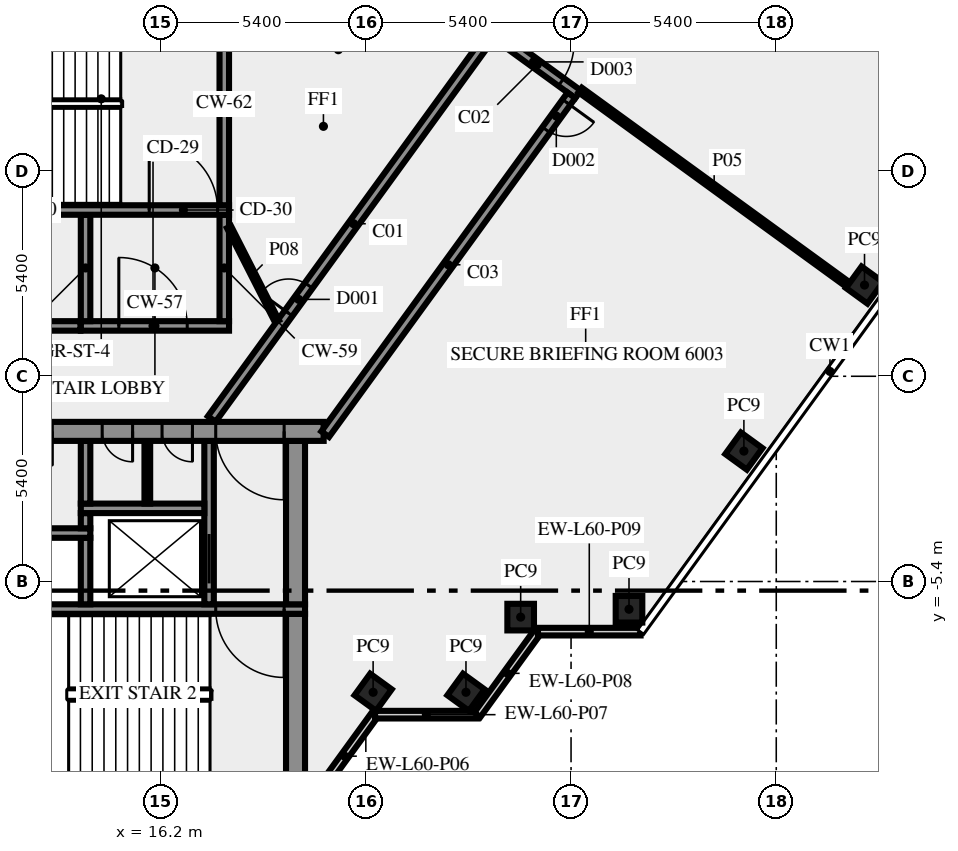
"""IFC4 building model, lengths in metres.
Left out: names, types, materials, properties, quantities, classifications, styles, units other than length and angle.
Written with IfcOpenShell. Run it as: python <this file> out.ifc"""

import sys

from ifc_helpers import new_model, si_unit, direction, frame, frame_2d, origin, origin_2d, place, context, subcontext, project, spatial, rectangle, extrude, element, fill, save


model = new_model("IFC4")
c1 = context("Model", 3, precision=1e-05, world=origin(), true_north=direction((0.0, 1.0)))
c2 = subcontext(c1, "Body", "Model", "MODEL_VIEW")
j1 = project(units=[si_unit("LENGTHUNIT", "METRE"), si_unit("PLANEANGLEUNIT", "RADIAN")], contexts=[c1])
p1 = place(None, origin())
s1 = spatial("IfcSite", under=j1, at=p1, CompositionType="ELEMENT")
p2 = place(p1, origin())
s2 = spatial("IfcBuilding", under=s1, at=p2, CompositionType="ELEMENT")
p3 = place(p2, frame((0.0, 0.0, 257.0)))
s3 = spatial("IfcBuildingStorey", under=s2, at=p3, CompositionType="ELEMENT", Elevation=257.0)
for number, where, z_axis, x_axis in (
    (1, (21.792, -8.315, 0.0), (0.0, 0.0, 1.0), (0.588, 0.809, 0.0)),
    (2, (24.235, -8.315, 0.0), (0.0, 0.0, 1.0), (0.588, 0.809, 0.0)),
    (3, (25.674, -6.337, 0.0), (0.0, 0.0, 1.0), (1.0, 0.0, 0.0)),
    (4, (28.525, -6.13, 0.0), (0.0, 0.0, 1.0), (1.0, 0.0, 0.0)),
    (5, (31.548, -1.969, 0.0), (0.0, 0.0, 1.0), (0.588, 0.809, 0.0)),
    (6, (34.722, 2.4, 0.0), (0.0, 0.0, 1.0), (0.588, 0.809, 0.0)),
):
    element("IfcColumn", number, at=place(p3, frame(where, z_axis=z_axis, x_axis=x_axis)), inside=s3, PredefinedType="COLUMN", context=c2, shape_type="SweptSolid", body=[
        extrude(rectangle(XDim=0.7, YDim=0.7, at=origin_2d()), origin(), (0.0, 0.0, 1.0), 3.65),
    ])
p4 = place(p3, frame((20.253, -11.083, 0.0), z_axis=(0.0, 0.0, 1.0), x_axis=(0.587766567315, 0.809030569476, 0.0)))
e7 = element("IfcWall", 7, at=p4, inside=s3, PredefinedType="SOLIDWALL", context=c2, shape_type="SweptSolid", body=[
    extrude(rectangle(XDim=2.688, YDim=0.2, at=frame_2d((1.344, 0.0))), origin(), (0.0, 0.0, 1.0), 3.65),
])
p5 = place(p3, frame((21.843, -8.904, 0.0), z_axis=(0.0, 0.0, 1.0), x_axis=(1.0, 0.0, 0.0)))
e8 = element("IfcWall", 8, at=p5, inside=s3, PredefinedType="SOLIDWALL", context=c2, shape_type="SweptSolid", body=[
    extrude(rectangle(XDim=2.7, YDim=0.2, at=frame_2d((1.35, 0.0))), origin(), (0.0, 0.0, 1.0), 3.65),
])
p6 = place(p3, frame((24.533, -8.909, 0.0), z_axis=(0.0, 0.0, 1.0), x_axis=(0.587720002413, 0.809064397168, 0.0)))
e9 = element("IfcWall", 9, at=p6, inside=s3, PredefinedType="SOLIDWALL", context=c2, shape_type="SweptSolid", body=[
    extrude(rectangle(XDim=2.7, YDim=0.2, at=frame_2d((1.35, 0.0))), origin(), (0.0, 0.0, 1.0), 3.65),
])
p7 = place(p3, frame((26.13, -6.719, 0.0), z_axis=(0.0, 0.0, 1.0), x_axis=(1.0, 0.0, 0.0)))
e10 = element("IfcWall", 10, at=p7, inside=s3, PredefinedType="SOLIDWALL", context=c2, shape_type="SweptSolid", body=[
    extrude(rectangle(XDim=2.7, YDim=0.2, at=frame_2d((1.35, 0.0))), origin(), (0.0, 0.0, 1.0), 3.65),
])
p8 = place(p3, frame((19.75, -10.5, 0.0), z_axis=(0.0, 0.0, 1.0), x_axis=(0.0, 1.0, 0.0)))
e11 = element("IfcWall", 11, at=p8, inside=s3, PredefinedType="SHEAR", context=c2, shape_type="SweptSolid", body=[
    extrude(rectangle(XDim=4.25, YDim=0.5, at=frame_2d((2.125, 0.0))), origin(), (0.0, 0.0, 1.0), 3.65),
])
p9 = place(p3, frame((20.0, -6.125, 0.0), z_axis=(0.0, 0.0, 1.0), x_axis=(-1.0, 0.0, 0.0)))
e12 = element("IfcWall", 12, at=p9, inside=s3, PredefinedType="SHEAR", context=c2, shape_type="SweptSolid", body=[
    extrude(rectangle(XDim=10.2, YDim=0.25, at=frame_2d((5.1, 0.0))), origin(), (0.0, 0.0, 1.0), 3.65),
])
p10 = place(p9, frame((0.55, 0.0, 0.0)))
e13 = element("IfcOpeningElement", 13, at=p10, cuts=e12, PredefinedType="OPENING", context=c2, shape_type="SweptSolid", body=[
    extrude(rectangle(XDim=1.8, YDim=2.1, at=frame_2d((0.9, 1.05))), frame((0.0, 0.135, 0.0), z_axis=(0.0, -1.0, 0.0), x_axis=(1.0, 0.0, 0.0)), (0.0, 0.0, 1.0), 0.27),
])
p11 = place(p3, frame((14.225, -6.0, 0.0), z_axis=(0.0, 0.0, 1.0), x_axis=(0.0, 1.0, 0.0)))
e14 = element("IfcWall", 14, at=p11, inside=s3, PredefinedType="SHEAR", context=c2, shape_type="SweptSolid", body=[
    extrude(rectangle(XDim=1.75, YDim=0.25, at=frame_2d((0.875, 0.0))), origin(), (0.0, 0.0, 1.0), 3.65),
])
p12 = place(p3, frame((17.475, -6.0, 0.0), z_axis=(0.0, 0.0, 1.0), x_axis=(0.0, 1.0, 0.0)))
e15 = element("IfcWall", 15, at=p12, inside=s3, PredefinedType="SHEAR", context=c2, shape_type="SweptSolid", body=[
    extrude(rectangle(XDim=4.3, YDim=0.25, at=frame_2d((2.15, 0.0))), origin(), (0.0, 0.0, 1.0), 3.65),
])
p13 = place(p12, frame((0.55, 0.0, 0.0)))
e16 = element("IfcOpeningElement", 16, at=p13, cuts=e15, PredefinedType="OPENING", context=c2, shape_type="SweptSolid", body=[
    extrude(rectangle(XDim=1.3, YDim=2.1, at=frame_2d((0.65, 1.05))), frame((0.0, 0.135, 0.0), z_axis=(0.0, -1.0, 0.0), x_axis=(1.0, 0.0, 0.0)), (0.0, 0.0, 1.0), 0.27),
])
p14 = place(p3, frame((19.75, -6.0, 0.0), z_axis=(0.0, 0.0, 1.0), x_axis=(0.0, 1.0, 0.0)))
e17 = element("IfcWall", 17, at=p14, inside=s3, PredefinedType="SHEAR", context=c2, shape_type="SweptSolid", body=[
    extrude(rectangle(XDim=4.3, YDim=0.5, at=frame_2d((2.15, 0.0))), origin(), (0.0, 0.0, 1.0), 3.65),
])
p15 = place(p3, frame((-0.6, -4.125, 0.0), z_axis=(0.0, 0.0, 1.0), x_axis=(1.0, 0.0, 0.0)))
e18 = element("IfcWall", 18, at=p15, inside=s3, PredefinedType="SHEAR", context=c2, shape_type="SweptSolid", body=[
    extrude(rectangle(XDim=14.95, YDim=0.25, at=frame_2d((7.475, 0.0))), origin(), (0.0, 0.0, 1.0), 3.65),
])
p16 = place(p15, frame((2.75, 0.0, 0.0)))
e19 = element("IfcOpeningElement", 19, at=p16, cuts=e18, PredefinedType="OPENING", context=c2, shape_type="SweptSolid", body=[
    extrude(rectangle(XDim=1.3, YDim=2.1, at=frame_2d((0.65, 1.05))), frame((0.0, 0.135, 0.0), z_axis=(0.0, -1.0, 0.0), x_axis=(1.0, 0.0, 0.0)), (0.0, 0.0, 1.0), 0.27),
])
p17 = place(p3, frame((14.225, -4.0, 0.0), z_axis=(0.0, 0.0, 1.0), x_axis=(0.0, 1.0, 0.0)))
e20 = element("IfcWall", 20, at=p17, inside=s3, PredefinedType="SHEAR", context=c2, shape_type="SweptSolid", body=[
    extrude(rectangle(XDim=0.4, YDim=0.25, at=frame_2d((0.2, 0.0))), origin(), (0.0, 0.0, 1.0), 3.65),
])
p18 = place(p3, frame((14.1, -3.475, 0.0), z_axis=(0.0, 0.0, 1.0), x_axis=(1.0, 0.0, 0.0)))
e21 = element("IfcWall", 21, at=p18, inside=s3, PredefinedType="SHEAR", context=c2, shape_type="SweptSolid", body=[
    extrude(rectangle(XDim=3.25, YDim=0.25, at=frame_2d((1.625, 0.0))), origin(), (0.0, 0.0, 1.0), 3.65),
])
p19 = place(p3, frame((14.225, -3.35, 0.0), z_axis=(0.0, 0.0, 1.0), x_axis=(0.0, 1.0, 0.0)))
e22 = element("IfcWall", 22, at=p19, inside=s3, PredefinedType="SHEAR", context=c2, shape_type="SweptSolid", body=[
    extrude(rectangle(XDim=1.65, YDim=0.25, at=frame_2d((0.825, 0.0))), origin(), (0.0, 0.0, 1.0), 3.65),
])
p20 = place(p3, frame((15.85, -3.35, 0.0), z_axis=(0.0, 0.0, 1.0), x_axis=(0.0, 1.0, 0.0)))
e23 = element("IfcWall", 23, at=p20, inside=s3, PredefinedType="PARTITIONING", context=c2, shape_type="SweptSolid", body=[
    extrude(rectangle(XDim=1.65, YDim=0.15, at=frame_2d((0.825, 0.0))), origin(), (0.0, 0.0, 1.0), 3.65),
])
p21 = place(p3, frame((20.49, -1.45, 0.0), z_axis=(0.0, 0.0, 1.0), x_axis=(-1.0, 0.0, 0.0)))
e24 = element("IfcWall", 24, at=p21, inside=s3, PredefinedType="SHEAR", context=c2, shape_type="SweptSolid", body=[
    extrude(rectangle(XDim=40.98, YDim=0.5, at=frame_2d((20.49, 0.0))), origin(), (0.0, 0.0, 1.0), 3.65),
])
p22 = place(p21, frame((38.14, 0.0, 0.0)))
e25 = element("IfcOpeningElement", 25, at=p22, cuts=e24, PredefinedType="OPENING", context=c2, shape_type="SweptSolid", body=[
    extrude(rectangle(XDim=1.8, YDim=2.1, at=frame_2d((0.9, 1.05))), frame((0.0, 0.26, 0.0), z_axis=(0.0, -1.0, 0.0), x_axis=(1.0, 0.0, 0.0)), (0.0, 0.0, 1.0), 0.52),
])
p23 = place(p21, frame((35.89, 0.0, 0.0)))
e26 = element("IfcOpeningElement", 26, at=p23, cuts=e24, PredefinedType="OPENING", context=c2, shape_type="SweptSolid", body=[
    extrude(rectangle(XDim=0.9, YDim=2.1, at=frame_2d((0.45, 1.05))), frame((0.0, 0.26, 0.0), z_axis=(0.0, -1.0, 0.0), x_axis=(1.0, 0.0, 0.0)), (0.0, 0.0, 1.0), 0.52),
])
p24 = place(p21, frame((32.94, 0.0, 0.0)))
e27 = element("IfcOpeningElement", 27, at=p24, cuts=e24, PredefinedType="OPENING", context=c2, shape_type="SweptSolid", body=[
    extrude(rectangle(XDim=0.9, YDim=2.1, at=frame_2d((0.45, 1.05))), frame((0.0, 0.26, 0.0), z_axis=(0.0, -1.0, 0.0), x_axis=(1.0, 0.0, 0.0)), (0.0, 0.0, 1.0), 0.52),
])
p25 = place(p21, frame((31.015, 0.0, 0.0)))
e28 = element("IfcOpeningElement", 28, at=p25, cuts=e24, PredefinedType="OPENING", context=c2, shape_type="SweptSolid", body=[
    extrude(rectangle(XDim=0.8, YDim=2.1, at=frame_2d((0.4, 1.05))), frame((0.0, 0.26, 0.0), z_axis=(0.0, -1.0, 0.0), x_axis=(1.0, 0.0, 0.0)), (0.0, 0.0, 1.0), 0.52),
])
p26 = place(p21, frame((24.765, 0.0, 0.0)))
e29 = element("IfcOpeningElement", 29, at=p26, cuts=e24, PredefinedType="OPENING", context=c2, shape_type="SweptSolid", body=[
    extrude(rectangle(XDim=0.8, YDim=2.1, at=frame_2d((0.4, 1.05))), frame((0.0, 0.26, 0.0), z_axis=(0.0, -1.0, 0.0), x_axis=(1.0, 0.0, 0.0)), (0.0, 0.0, 1.0), 0.52),
])
p27 = place(p21, frame((21.765, 0.0, 0.0)))
e30 = element("IfcOpeningElement", 30, at=p27, cuts=e24, PredefinedType="OPENING", context=c2, shape_type="SweptSolid", body=[
    extrude(rectangle(XDim=2.0, YDim=2.1, at=frame_2d((1.0, 1.05))), frame((0.0, 0.26, 0.0), z_axis=(0.0, -1.0, 0.0), x_axis=(1.0, 0.0, 0.0)), (0.0, 0.0, 1.0), 0.52),
])
p28 = place(p21, frame((14.202, 0.0, 0.0)))
e31 = element("IfcOpeningElement", 31, at=p28, cuts=e24, PredefinedType="OPENING", context=c2, shape_type="SweptSolid", body=[
    extrude(rectangle(XDim=0.9, YDim=2.1, at=frame_2d((0.45, 1.05))), frame((0.0, 0.26, 0.0), z_axis=(0.0, -1.0, 0.0), x_axis=(1.0, 0.0, 0.0)), (0.0, 0.0, 1.0), 0.52),
])
p29 = place(p21, frame((10.478, 0.0, 0.0)))
e32 = element("IfcOpeningElement", 32, at=p29, cuts=e24, PredefinedType="OPENING", context=c2, shape_type="SweptSolid", body=[
    extrude(rectangle(XDim=0.9, YDim=2.1, at=frame_2d((0.45, 1.05))), frame((0.0, 0.26, 0.0), z_axis=(0.0, -1.0, 0.0), x_axis=(1.0, 0.0, 0.0)), (0.0, 0.0, 1.0), 0.52),
])
p30 = place(p21, frame((7.14, 0.0, 0.0)))
e33 = element("IfcOpeningElement", 33, at=p30, cuts=e24, PredefinedType="OPENING", context=c2, shape_type="SweptSolid", body=[
    extrude(rectangle(XDim=0.9, YDim=2.1, at=frame_2d((0.45, 1.05))), frame((0.0, 0.26, 0.0), z_axis=(0.0, -1.0, 0.0), x_axis=(1.0, 0.0, 0.0)), (0.0, 0.0, 1.0), 0.52),
])
p31 = place(p21, frame((5.028, 0.0, 0.0)))
e34 = element("IfcOpeningElement", 34, at=p31, cuts=e24, PredefinedType="OPENING", context=c2, shape_type="SweptSolid", body=[
    extrude(rectangle(XDim=0.8, YDim=2.1, at=frame_2d((0.4, 1.05))), frame((0.0, 0.26, 0.0), z_axis=(0.0, -1.0, 0.0), x_axis=(1.0, 0.0, 0.0)), (0.0, 0.0, 1.0), 0.52),
])
p32 = place(p21, frame((3.452, 0.0, 0.0)))
e35 = element("IfcOpeningElement", 35, at=p32, cuts=e24, PredefinedType="OPENING", context=c2, shape_type="SweptSolid", body=[
    extrude(rectangle(XDim=0.8, YDim=2.1, at=frame_2d((0.4, 1.05))), frame((0.0, 0.26, 0.0), z_axis=(0.0, -1.0, 0.0), x_axis=(1.0, 0.0, 0.0)), (0.0, 0.0, 1.0), 0.52),
])
p33 = place(p21, frame((1.04, 0.0, 0.0)))
e36 = element("IfcOpeningElement", 36, at=p33, cuts=e24, PredefinedType="OPENING", context=c2, shape_type="SweptSolid", body=[
    extrude(rectangle(XDim=1.8, YDim=2.1, at=frame_2d((0.9, 1.05))), frame((0.0, 0.26, 0.0), z_axis=(0.0, -1.0, 0.0), x_axis=(1.0, 0.0, 0.0)), (0.0, 0.0, 1.0), 0.52),
])
p34 = place(p3, frame((14.1, 1.325, 0.0), z_axis=(0.0, 0.0, 1.0), x_axis=(1.0, 0.0, 0.0)))
e37 = element("IfcWall", 37, at=p34, inside=s3, PredefinedType="SHEAR", context=c2, shape_type="SweptSolid", body=[
    extrude(rectangle(XDim=3.9, YDim=0.25, at=frame_2d((1.95, 0.0))), origin(), (0.0, 0.0, 1.0), 3.65),
])
p35 = place(p34, frame((1.0, 0.0, 0.0)))
e38 = element("IfcOpeningElement", 38, at=p35, cuts=e37, PredefinedType="OPENING", context=c2, shape_type="SweptSolid", body=[
    extrude(rectangle(XDim=1.8, YDim=2.1, at=frame_2d((0.9, 1.05))), frame((0.0, 0.135, 0.0), z_axis=(0.0, -1.0, 0.0), x_axis=(1.0, 0.0, 0.0)), (0.0, 0.0, 1.0), 0.27),
])
for number, where, z_axis, x_axis in (
    (39, (14.225, 1.45, 0.0), (0.0, 0.0, 1.0), (0.0, 1.0, 0.0)),
    (40, (17.875, 1.45, 0.0), (0.0, 0.0, 1.0), (0.0, 1.0, 0.0)),
):
    element("IfcWall", number, at=place(p3, frame(where, z_axis=z_axis, x_axis=x_axis)), inside=s3, PredefinedType="SHEAR", context=c2, shape_type="SweptSolid", body=[
        extrude(rectangle(XDim=2.8, YDim=0.25, at=frame_2d((1.4, 0.0))), origin(), (0.0, 0.0, 1.0), 3.65),
    ])
p36 = place(p3, frame((7.5, 4.375, 0.0), z_axis=(0.0, 0.0, 1.0), x_axis=(1.0, 0.0, 0.0)))
e41 = element("IfcWall", 41, at=p36, inside=s3, PredefinedType="SHEAR", context=c2, shape_type="SweptSolid", body=[
    extrude(rectangle(XDim=10.5, YDim=0.25, at=frame_2d((5.25, 0.0))), origin(), (0.0, 0.0, 1.0), 3.65),
])
p37 = place(p36, frame((8.4, 0.0, 0.0)))
e42 = element("IfcOpeningElement", 42, at=p37, cuts=e41, PredefinedType="OPENING", context=c2, shape_type="SweptSolid", body=[
    extrude(rectangle(XDim=1.8, YDim=2.1, at=frame_2d((0.9, 1.05))), frame((0.0, 0.135, 0.0), z_axis=(0.0, -1.0, 0.0), x_axis=(1.0, 0.0, 0.0)), (0.0, 0.0, 1.0), 0.27),
])
p38 = place(p3, frame((17.875, 4.5, 0.0), z_axis=(0.0, 0.0, 1.0), x_axis=(0.0, 1.0, 0.0)))
e43 = element("IfcWall", 43, at=p38, inside=s3, PredefinedType="SHEAR", context=c2, shape_type="SweptSolid", body=[
    extrude(rectangle(XDim=5.35, YDim=0.25, at=frame_2d((2.675, 0.0))), origin(), (0.0, 0.0, 1.0), 3.65),
])
p39 = place(p3, frame((17.545, -1.125, 0.0), z_axis=(0.0, 0.0, 1.0), x_axis=(0.587796810203, 0.809008596935, 0.0)))
e44 = element("IfcWall", 44, at=p39, inside=s3, PredefinedType="SOLIDWALL", context=c2, shape_type="SweptSolid", body=[
    extrude(rectangle(XDim=12.703, YDim=0.25, at=frame_2d((6.352, 0.0))), origin(), (0.0, 0.0, 1.0), 3.65),
])
p40 = place(p39, frame((3.441, 0.0, 0.0)))
e45 = element("IfcOpeningElement", 45, at=p40, cuts=e44, PredefinedType="OPENING", context=c2, shape_type="SweptSolid", body=[
    extrude(rectangle(XDim=0.9, YDim=2.1, at=frame_2d((0.45, 1.05))), frame((0.0, 0.135, 0.0), z_axis=(0.0, -1.0, 0.0), x_axis=(1.0, 0.0, 0.0)), (0.0, 0.0, 1.0), 0.27),
])
p41 = place(p3, frame((25.039, 8.978, 0.0), z_axis=(0.0, 0.0, 1.0), x_axis=(0.809006914995, -0.587799125119, 0.0)))
e46 = element("IfcWall", 46, at=p41, inside=s3, PredefinedType="SOLIDWALL", context=c2, shape_type="SweptSolid", body=[
    extrude(rectangle(XDim=2.65, YDim=0.25, at=frame_2d((1.325, 0.0))), origin(), (0.0, 0.0, 1.0), 3.65),
])
p42 = place(p41, frame((0.301, 0.0, 0.0)))
e47 = element("IfcOpeningElement", 47, at=p42, cuts=e46, PredefinedType="OPENING", context=c2, shape_type="SweptSolid", body=[
    extrude(rectangle(XDim=1.8, YDim=2.1, at=frame_2d((0.9, 1.05))), frame((0.0, 0.135, 0.0), z_axis=(0.0, -1.0, 0.0), x_axis=(1.0, 0.0, 0.0)), (0.0, 0.0, 1.0), 0.27),
])
p43 = place(p3, frame((27.009, 7.392, 0.0), z_axis=(0.0, 0.0, 1.0), x_axis=(-0.587776457057, -0.809023384414, 0.0)))
e48 = element("IfcWall", 48, at=p43, inside=s3, PredefinedType="SOLIDWALL", context=c2, shape_type="SweptSolid", body=[
    extrude(rectangle(XDim=11.021, YDim=0.25, at=frame_2d((5.51, 0.0))), origin(), (0.0, 0.0, 1.0), 3.65),
])
p44 = place(p43, frame((0.225, 0.0, 0.0)))
e49 = element("IfcOpeningElement", 49, at=p44, cuts=e48, PredefinedType="OPENING", context=c2, shape_type="SweptSolid", body=[
    extrude(rectangle(XDim=0.9, YDim=2.1, at=frame_2d((0.45, 1.05))), frame((0.0, 0.135, 0.0), z_axis=(0.0, -1.0, 0.0), x_axis=(1.0, 0.0, 0.0)), (0.0, 0.0, 1.0), 0.27),
])
p45 = place(p3, frame((-5.246, 1.325, 0.0), z_axis=(0.0, 0.0, 1.0), x_axis=(1.0, 0.0, 0.0)))
e50 = element("IfcWall", 50, at=p45, inside=s3, PredefinedType="SOLIDWALL", context=c2, shape_type="SweptSolid", body=[
    extrude(rectangle(XDim=19.336, YDim=0.25, at=frame_2d((9.668, 0.0))), origin(), (0.0, 0.0, 1.0), 3.65),
])
p46 = place(p45, frame((5.435, 0.0, 0.0)))
e51 = element("IfcOpeningElement", 51, at=p46, cuts=e50, PredefinedType="OPENING", context=c2, shape_type="SweptSolid", body=[
    extrude(rectangle(XDim=0.9, YDim=2.1, at=frame_2d((0.45, 1.05))), frame((0.0, 0.135, 0.0), z_axis=(0.0, -1.0, 0.0), x_axis=(1.0, 0.0, 0.0)), (0.0, 0.0, 1.0), 0.27),
])
p47 = place(p45, frame((9.915, 0.0, 0.0)))
e52 = element("IfcOpeningElement", 52, at=p47, cuts=e50, PredefinedType="OPENING", context=c2, shape_type="SweptSolid", body=[
    extrude(rectangle(XDim=0.9, YDim=2.1, at=frame_2d((0.45, 1.05))), frame((0.0, 0.135, 0.0), z_axis=(0.0, -1.0, 0.0), x_axis=(1.0, 0.0, 0.0)), (0.0, 0.0, 1.0), 0.27),
])
p48 = place(p45, frame((8.315, 0.0, 0.0)))
e53 = element("IfcOpeningElement", 53, at=p48, cuts=e50, PredefinedType="OPENING", context=c2, shape_type="SweptSolid", body=[
    extrude(rectangle(XDim=0.9, YDim=2.1, at=frame_2d((0.45, 1.05))), frame((0.0, 0.135, 0.0), z_axis=(0.0, -1.0, 0.0), x_axis=(1.0, 0.0, 0.0)), (0.0, 0.0, 1.0), 0.27),
])
p49 = place(p3, frame((27.24, 7.532, 0.0), z_axis=(0.0, 0.0, 1.0), x_axis=(0.809027940177, -0.587770186393, 0.0)))
e54 = element("IfcWall", 54, at=p49, inside=s3, PredefinedType="PARTITIONING", context=c2, shape_type="SweptSolid", body=[
    extrude(rectangle(XDim=8.715, YDim=0.15, at=frame_2d((4.357, 0.0))), origin(), (0.0, 0.0, 1.0), 3.65),
])
p50 = place(p3, frame((18.0, 3.925, 0.0), z_axis=(0.0, 0.0, 1.0), x_axis=(0.453950796792, -0.891026752736, 0.0)))
e55 = element("IfcWall", 55, at=p50, inside=s3, PredefinedType="PARTITIONING", context=c2, shape_type="SweptSolid", body=[
    extrude(rectangle(XDim=2.778, YDim=0.12, at=frame_2d((1.389, 0.0))), origin(), (0.0, 0.0, 1.0), 3.65),
])
p51 = place(p10, origin())
e56 = element("IfcDoor", 56, at=p51, inside=s3, OperationType="DOUBLE_DOOR_SINGLE_SWING", PredefinedType="DOOR", context=c2, shape_type="SweptSolid", body=[
    extrude(rectangle(XDim=1.8, YDim=2.1, at=frame_2d((0.9, 1.05))), frame((0.0, 0.025, 0.0), z_axis=(0.0, -1.0, 0.0), x_axis=(1.0, 0.0, 0.0)), (0.0, 0.0, 1.0), 0.05),
])
fill(e13, e56)
p52 = place(p13, origin())
e57 = element("IfcDoor", 57, at=p52, inside=s3, OperationType="DOUBLE_DOOR_SLIDING", PredefinedType="DOOR", context=c2, shape_type="SweptSolid", body=[
    extrude(rectangle(XDim=1.3, YDim=2.1, at=frame_2d((0.65, 1.05))), frame((0.0, 0.025, 0.0), z_axis=(0.0, -1.0, 0.0), x_axis=(1.0, 0.0, 0.0)), (0.0, 0.0, 1.0), 0.05),
])
fill(e16, e57)
p53 = place(p31, origin())
e58 = element("IfcDoor", 58, at=p53, inside=s3, OperationType="SINGLE_SWING_LEFT", PredefinedType="DOOR", context=c2, shape_type="SweptSolid", body=[
    extrude(rectangle(XDim=0.8, YDim=2.1, at=frame_2d((0.4, 1.05))), frame((0.0, 0.025, 0.0), z_axis=(0.0, -1.0, 0.0), x_axis=(1.0, 0.0, 0.0)), (0.0, 0.0, 1.0), 0.05),
])
fill(e34, e58)
p54 = place(p32, origin())
e59 = element("IfcDoor", 59, at=p54, inside=s3, OperationType="SINGLE_SWING_LEFT", PredefinedType="DOOR", context=c2, shape_type="SweptSolid", body=[
    extrude(rectangle(XDim=0.8, YDim=2.1, at=frame_2d((0.4, 1.05))), frame((0.0, 0.025, 0.0), z_axis=(0.0, -1.0, 0.0), x_axis=(1.0, 0.0, 0.0)), (0.0, 0.0, 1.0), 0.05),
])
fill(e35, e59)
p55 = place(p33, origin())
e60 = element("IfcDoor", 60, at=p55, inside=s3, OperationType="DOUBLE_DOOR_SINGLE_SWING", PredefinedType="DOOR", context=c2, shape_type="SweptSolid", body=[
    extrude(rectangle(XDim=1.8, YDim=2.1, at=frame_2d((0.9, 1.05))), frame((0.0, 0.025, 0.0), z_axis=(0.0, -1.0, 0.0), x_axis=(1.0, 0.0, 0.0)), (0.0, 0.0, 1.0), 0.05),
])
fill(e36, e60)
p56 = place(p35, origin())
e61 = element("IfcDoor", 61, at=p56, inside=s3, OperationType="DOUBLE_DOOR_SINGLE_SWING", PredefinedType="DOOR", context=c2, shape_type="SweptSolid", body=[
    extrude(rectangle(XDim=1.8, YDim=2.1, at=frame_2d((0.9, 1.05))), frame((0.0, 0.025, 0.0), z_axis=(0.0, -1.0, 0.0), x_axis=(1.0, 0.0, 0.0)), (0.0, 0.0, 1.0), 0.05),
])
fill(e38, e61)
p57 = place(p37, origin())
e62 = element("IfcDoor", 62, at=p57, inside=s3, OperationType="DOUBLE_DOOR_SINGLE_SWING", PredefinedType="DOOR", context=c2, shape_type="SweptSolid", body=[
    extrude(rectangle(XDim=1.8, YDim=2.1, at=frame_2d((0.9, 1.05))), frame((0.0, 0.025, 0.0), z_axis=(0.0, -1.0, 0.0), x_axis=(1.0, 0.0, 0.0)), (0.0, 0.0, 1.0), 0.05),
])
fill(e42, e62)
p58 = place(p40, origin())
e63 = element("IfcDoor", 63, at=p58, inside=s3, OperationType="SINGLE_SWING_LEFT", PredefinedType="DOOR", context=c2, shape_type="SweptSolid", body=[
    extrude(rectangle(XDim=0.9, YDim=2.1, at=frame_2d((0.45, 1.05))), frame((0.0, 0.025, 0.0), z_axis=(0.0, -1.0, 0.0), x_axis=(1.0, 0.0, 0.0)), (0.0, 0.0, 1.0), 0.05),
])
fill(e45, e63)
p59 = place(p42, origin())
e64 = element("IfcDoor", 64, at=p59, inside=s3, OperationType="DOUBLE_DOOR_SINGLE_SWING", PredefinedType="DOOR", context=c2, shape_type="SweptSolid", body=[
    extrude(rectangle(XDim=1.8, YDim=2.1, at=frame_2d((0.9, 1.05))), frame((0.0, 0.025, 0.0), z_axis=(0.0, -1.0, 0.0), x_axis=(1.0, 0.0, 0.0)), (0.0, 0.0, 1.0), 0.05),
])
fill(e47, e64)
p60 = place(p44, origin())
e65 = element("IfcDoor", 65, at=p60, inside=s3, OperationType="SINGLE_SWING_LEFT", PredefinedType="DOOR", context=c2, shape_type="SweptSolid", body=[
    extrude(rectangle(XDim=0.9, YDim=2.1, at=frame_2d((0.45, 1.05))), frame((0.0, 0.025, 0.0), z_axis=(0.0, -1.0, 0.0), x_axis=(1.0, 0.0, 0.0)), (0.0, 0.0, 1.0), 0.05),
])
fill(e49, e65)
save(model, sys.argv[1])
